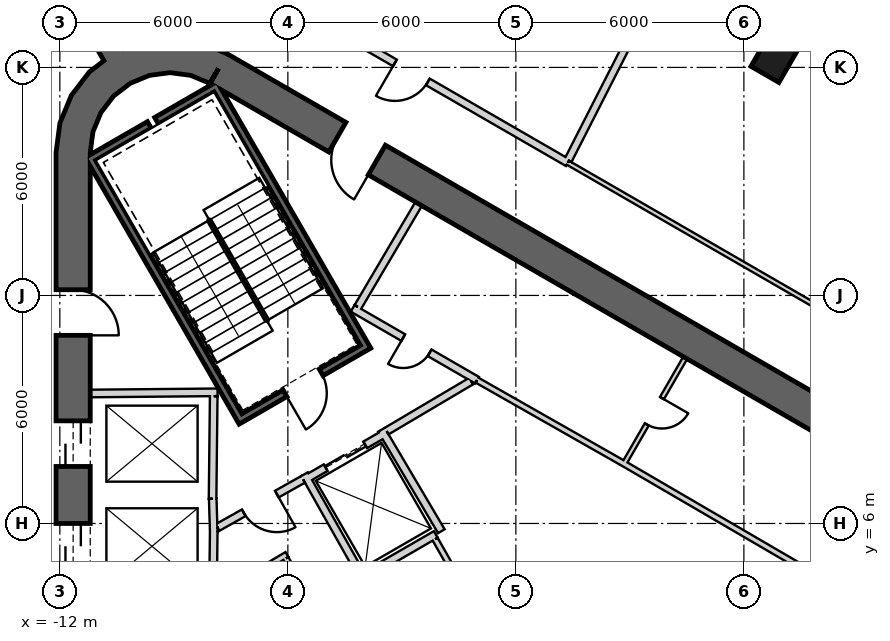
"""IFC4 building model, lengths in metres.
Left out: names, types, materials, properties, quantities, classifications, styles, units other than length and angle.
Written with IfcOpenShell. Run it as: python <this file> out.ifc"""

import sys

from ifc_helpers import new_model, si_unit, direction, frame, frame_2d, origin, origin_2d, place, context, subcontext, project, spatial, polyline, rectangle, outline, extrude, element, fill, save


model = new_model("IFC4")
c1 = context("Model", 3, precision=1e-05, world=origin(), true_north=direction((0.0, 1.0)))
c2 = subcontext(c1, "Body", "Model", "MODEL_VIEW")
j1 = project(units=[si_unit("LENGTHUNIT", "METRE"), si_unit("PLANEANGLEUNIT", "RADIAN")], contexts=[c1])
p1 = place(None, origin())
s1 = spatial("IfcSite", under=j1, at=p1, CompositionType="ELEMENT")
p2 = place(p1, origin())
s2 = spatial("IfcBuilding", under=s1, at=p2, CompositionType="ELEMENT")
p3 = place(p2, frame((0.0, 0.0, 357.2)))
s3 = spatial("IfcBuildingStorey", under=s2, at=p3, CompositionType="ELEMENT", Elevation=357.2)
p4 = place(p3, frame((6.904, 18.422, 0.0), z_axis=(0.0, 0.0, 1.0), x_axis=(0.5, 0.866025403784, 0.0)))
e1 = element("IfcColumn", 1, at=p4, inside=s3, PredefinedType="COLUMN", context=c2, shape_type="SweptSolid", body=[
    extrude(rectangle(XDim=1.4, YDim=0.85, at=origin_2d()), origin(), (0.0, 0.0, 1.0), 3.9),
])
p5 = place(p3, frame((19.475, 2.208, 0.0), z_axis=(0.0, 0.0, 1.0), x_axis=(-0.866028369851, 0.499994862586, 0.0)))
e2 = element("IfcWall", 2, at=p5, inside=s3, PredefinedType="SHEAR", context=c2, shape_type="SweptSolid", body=[
    extrude(rectangle(XDim=31.523, YDim=0.9, at=frame_2d((15.762, 0.0))), origin(), (0.0, 0.0, 1.0), 3.9),
])
p6 = place(p5, frame((7.062, 0.0, 0.0)))
e3 = element("IfcOpeningElement", 3, at=p6, cuts=e2, PredefinedType="OPENING", context=c2, shape_type="SweptSolid", body=[
    extrude(rectangle(XDim=1.2, YDim=2.4, at=frame_2d((0.6, 1.2))), frame((0.0, 0.46, 0.0), z_axis=(0.0, -1.0, 0.0), x_axis=(1.0, 0.0, 0.0)), (0.0, 0.0, 1.0), 0.92),
])
p7 = place(p5, frame((3.612, 0.0, 0.0)))
e4 = element("IfcOpeningElement", 4, at=p7, cuts=e2, PredefinedType="OPENING", context=c2, shape_type="SweptSolid", body=[
    extrude(rectangle(XDim=1.2, YDim=2.4, at=frame_2d((0.6, 1.2))), frame((0.0, 0.46, 0.0), z_axis=(0.0, -1.0, 0.0), x_axis=(1.0, 0.0, 0.0)), (0.0, 0.0, 1.0), 0.92),
])
p8 = place(p5, frame((26.712, 0.0, 0.0)))
e5 = element("IfcOpeningElement", 5, at=p8, cuts=e2, PredefinedType="OPENING", context=c2, shape_type="SweptSolid", body=[
    extrude(rectangle(XDim=1.2, YDim=2.4, at=frame_2d((0.6, 1.2))), frame((0.0, 0.46, 0.0), z_axis=(0.0, -1.0, 0.0), x_axis=(1.0, 0.0, 0.0)), (0.0, 0.0, 1.0), 0.92),
])
p9 = place(p3, frame((-11.65, 15.762, 0.0), z_axis=(0.0, 0.0, 1.0), x_axis=(0.0, -1.0, 0.0)))
e6 = element("IfcWall", 6, at=p9, inside=s3, PredefinedType="SHEAR", context=c2, shape_type="SweptSolid", body=[
    extrude(rectangle(XDim=31.523, YDim=0.9, at=frame_2d((15.762, 0.0))), origin(), (0.0, 0.0, 1.0), 3.9),
])
p10 = place(p9, frame((7.062, 0.0, 0.0)))
e7 = element("IfcOpeningElement", 7, at=p10, cuts=e6, PredefinedType="OPENING", context=c2, shape_type="SweptSolid", body=[
    extrude(rectangle(XDim=1.2, YDim=2.4, at=frame_2d((0.6, 1.2))), frame((0.0, 0.46, 0.0), z_axis=(0.0, -1.0, 0.0), x_axis=(1.0, 0.0, 0.0)), (0.0, 0.0, 1.0), 0.92),
])
p11 = place(p9, frame((9.762, 0.0, 0.0)))
e8 = element("IfcOpeningElement", 8, at=p11, cuts=e6, PredefinedType="OPENING", context=c2, shape_type="SweptSolid", body=[
    extrude(rectangle(XDim=1.2, YDim=2.4, at=frame_2d((0.6, 1.2))), frame((0.0, 0.46, 0.0), z_axis=(0.0, -1.0, 0.0), x_axis=(1.0, 0.0, 0.0)), (0.0, 0.0, 1.0), 0.92),
])
p12 = place(p9, frame((12.462, 0.0, 0.0)))
e9 = element("IfcOpeningElement", 9, at=p12, cuts=e6, PredefinedType="OPENING", context=c2, shape_type="SweptSolid", body=[
    extrude(rectangle(XDim=1.2, YDim=2.4, at=frame_2d((0.6, 1.2))), frame((0.0, 0.46, 0.0), z_axis=(0.0, -1.0, 0.0), x_axis=(1.0, 0.0, 0.0)), (0.0, 0.0, 1.0), 0.92),
])
p13 = place(p9, frame((15.162, 0.0, 0.0)))
e10 = element("IfcOpeningElement", 10, at=p13, cuts=e6, PredefinedType="OPENING", context=c2, shape_type="SweptSolid", body=[
    extrude(rectangle(XDim=1.2, YDim=2.4, at=frame_2d((0.6, 1.2))), frame((0.0, 0.46, 0.0), z_axis=(0.0, -1.0, 0.0), x_axis=(1.0, 0.0, 0.0)), (0.0, 0.0, 1.0), 0.92),
])
p14 = place(p9, frame((17.862, 0.0, 0.0)))
e11 = element("IfcOpeningElement", 11, at=p14, cuts=e6, PredefinedType="OPENING", context=c2, shape_type="SweptSolid", body=[
    extrude(rectangle(XDim=1.2, YDim=2.4, at=frame_2d((0.6, 1.2))), frame((0.0, 0.46, 0.0), z_axis=(0.0, -1.0, 0.0), x_axis=(1.0, 0.0, 0.0)), (0.0, 0.0, 1.0), 0.92),
])
p15 = place(p9, frame((20.562, 0.0, 0.0)))
e12 = element("IfcOpeningElement", 12, at=p15, cuts=e6, PredefinedType="OPENING", context=c2, shape_type="SweptSolid", body=[
    extrude(rectangle(XDim=1.2, YDim=2.4, at=frame_2d((0.6, 1.2))), frame((0.0, 0.46, 0.0), z_axis=(0.0, -1.0, 0.0), x_axis=(1.0, 0.0, 0.0)), (0.0, 0.0, 1.0), 0.92),
])
p16 = place(p9, frame((23.262, 0.0, 0.0)))
e13 = element("IfcOpeningElement", 13, at=p16, cuts=e6, PredefinedType="OPENING", context=c2, shape_type="SweptSolid", body=[
    extrude(rectangle(XDim=1.2, YDim=2.4, at=frame_2d((0.6, 1.2))), frame((0.0, 0.46, 0.0), z_axis=(0.0, -1.0, 0.0), x_axis=(1.0, 0.0, 0.0)), (0.0, 0.0, 1.0), 0.92),
])
p17 = place(p9, frame((3.612, 0.0, 0.0)))
e14 = element("IfcOpeningElement", 14, at=p17, cuts=e6, PredefinedType="OPENING", context=c2, shape_type="SweptSolid", body=[
    extrude(rectangle(XDim=1.2, YDim=2.4, at=frame_2d((0.6, 1.2))), frame((0.0, 0.46, 0.0), z_axis=(0.0, -1.0, 0.0), x_axis=(1.0, 0.0, 0.0)), (0.0, 0.0, 1.0), 0.92),
])
p18 = place(p9, frame((26.712, 0.0, 0.0)))
e15 = element("IfcOpeningElement", 15, at=p18, cuts=e6, PredefinedType="OPENING", context=c2, shape_type="SweptSolid", body=[
    extrude(rectangle(XDim=1.2, YDim=2.4, at=frame_2d((0.6, 1.2))), frame((0.0, 0.46, 0.0), z_axis=(0.0, -1.0, 0.0), x_axis=(1.0, 0.0, 0.0)), (0.0, 0.0, 1.0), 0.92),
])
p19 = place(p3, origin())
e16 = element("IfcWall", 16, at=p19, inside=s3, PredefinedType="SHEAR", context=c2, shape_type="SweptSolid", body=[
    extrude(outline(polyline([(-7.6, 18.36), (-8.323, 18.659), (-9.1, 18.762), (-9.876, 18.659), (-10.6, 18.36), (-11.221, 17.883), (-11.698, 17.262), (-11.998, 16.538), (-12.1, 15.762), (-11.2, 15.762), (-11.128, 16.305), (-10.919, 16.812), (-10.585, 17.247), (-10.15, 17.58), (-9.644, 17.79), (-9.1, 17.862), (-8.556, 17.79), (-8.05, 17.58), (-7.6, 18.36)])), origin(), (0.0, 0.0, 1.0), 3.9),
])
p20 = place(p3, frame((-10.575, 18.316, 0.0), z_axis=(0.0, 0.0, 1.0), x_axis=(-0.500009454961, 0.866019944892, 0.0)))
e17 = element("IfcWall", 17, at=p20, inside=s3, PredefinedType="SHEAR", context=c2, shape_type="SweptSolid", body=[
    extrude(rectangle(XDim=7.388, YDim=0.6, at=frame_2d((3.694, 0.0))), origin(), (0.0, 0.0, 1.0), 3.9),
])
p21 = place(p20, frame((1.4, 0.0, 0.0)))
e18 = element("IfcOpeningElement", 18, at=p21, cuts=e17, PredefinedType="OPENING", context=c2, shape_type="SweptSolid", body=[
    extrude(rectangle(XDim=1.4, YDim=2.4, at=frame_2d((0.7, 1.2))), frame((0.0, 0.31, 0.0), z_axis=(0.0, -1.0, 0.0), x_axis=(1.0, 0.0, 0.0)), (0.0, 0.0, 1.0), 0.62),
])
p22 = place(p3, frame((-11.2, 9.42, 0.0), z_axis=(0.0, 0.0, 1.0), x_axis=(0.999957167047, 0.009255488683, 0.0)))
e19 = element("IfcWall", 19, at=p22, inside=s3, PredefinedType="PLUMBINGWALL", context=c2, shape_type="SweptSolid", body=[
    extrude(rectangle(XDim=3.35, YDim=0.2, at=frame_2d((1.675, 0.0))), origin(), (0.0, 0.0, 1.0), 3.6),
])
p23 = place(p3, frame((-7.951, 9.35, 0.0), z_axis=(0.0, 0.0, 1.0), x_axis=(-0.011120469654, -0.999938165666, 0.0)))
e20 = element("IfcWall", 20, at=p23, inside=s3, PredefinedType="PLUMBINGWALL", context=c2, shape_type="SweptSolid", body=[
    extrude(rectangle(XDim=2.7, YDim=0.2, at=frame_2d((1.35, 0.0))), origin(), (0.0, 0.0, 1.0), 3.6),
])
p24 = place(p3, frame((-7.977, 6.65, 0.0), z_axis=(0.0, 0.0, 1.0), x_axis=(0.030861509705, -0.999523670164, 0.0)))
e21 = element("IfcWall", 21, at=p24, inside=s3, PredefinedType="PLUMBINGWALL", context=c2, shape_type="SweptSolid", body=[
    extrude(rectangle(XDim=0.878, YDim=0.2, at=frame_2d((0.439, 0.0))), origin(), (0.0, 0.0, 1.0), 3.6),
])
p25 = place(p3, frame((-7.949, 5.895, 0.0), z_axis=(0.0, 0.0, 1.0), x_axis=(-0.012042535896, -0.999927486035, 0.0)))
e22 = element("IfcWall", 22, at=p25, inside=s3, PredefinedType="PLUMBINGWALL", context=c2, shape_type="SweptSolid", body=[
    extrude(rectangle(XDim=1.845, YDim=0.2, at=frame_2d((0.922, 0.0))), origin(), (0.0, 0.0, 1.0), 3.6),
])
p26 = place(p3, frame((-11.245, 15.678, -0.3), z_axis=(0.0, 0.0, 1.0), x_axis=(0.499977274689, -0.866038523851, 0.0)))
e23 = element("IfcWall", 23, at=p26, inside=s3, PredefinedType="SHEAR", context=c2, shape_type="SweptSolid", body=[
    extrude(rectangle(XDim=8.1, YDim=0.2, at=frame_2d((4.05, 0.0))), origin(), (0.0, 0.0, 1.0), 3.9),
])
p27 = place(p3, frame((-7.818, 17.541, -0.3), z_axis=(0.0, 0.0, 1.0), x_axis=(-0.866044365799, -0.499967155389, 0.0)))
e24 = element("IfcWall", 24, at=p27, inside=s3, PredefinedType="SHEAR", context=c2, shape_type="SweptSolid", body=[
    extrude(rectangle(XDim=3.8, YDim=0.2, at=frame_2d((1.9, 0.0))), origin(), (0.0, 0.0, 1.0), 3.9),
])
p28 = place(p3, frame((-7.854, 17.405, -0.3), z_axis=(0.0, 0.0, 1.0), x_axis=(0.499997992926, -0.866026562566, 0.0)))
e25 = element("IfcWall", 25, at=p28, inside=s3, PredefinedType="SHEAR", context=c2, shape_type="SweptSolid", body=[
    extrude(rectangle(XDim=7.9, YDim=0.2, at=frame_2d((3.95, 0.0))), origin(), (0.0, 0.0, 1.0), 3.9),
])
p29 = place(p3, frame((-7.159, 8.8, -0.3), z_axis=(0.0, 0.0, 1.0), x_axis=(0.866047807691, 0.499961193289, 0.0)))
e26 = element("IfcWall", 26, at=p29, inside=s3, PredefinedType="SHEAR", context=c2, shape_type="SweptSolid", body=[
    extrude(rectangle(XDim=3.6, YDim=0.2, at=frame_2d((1.8, 0.0))), origin(), (0.0, 0.0, 1.0), 3.9),
])
p30 = place(p29, frame((1.25, 0.0, 0.3)))
e27 = element("IfcOpeningElement", 27, at=p30, cuts=e26, PredefinedType="OPENING", context=c2, shape_type="SweptSolid", body=[
    extrude(rectangle(XDim=1.1, YDim=2.1, at=frame_2d((0.55, 1.05))), frame((0.0, 0.11, 0.0), z_axis=(0.0, -1.0, 0.0), x_axis=(1.0, 0.0, 0.0)), (0.0, 0.0, 1.0), 0.22),
])
p31 = place(p3, frame((-5.524, 7.168, 0.0), z_axis=(0.0, 0.0, 1.0), x_axis=(0.866024647952, 0.500001309137, 0.0)))
e28 = element("IfcWall", 28, at=p31, inside=s3, PredefinedType="PLUMBINGWALL", context=c2, shape_type="SweptSolid", body=[
    extrude(rectangle(XDim=2.4, YDim=0.2, at=frame_2d((1.2, 0.0))), origin(), (0.0, 0.0, 1.0), 3.6),
])
p32 = place(p31, frame((0.6, 0.0, 0.0)))
e29 = element("IfcOpeningElement", 29, at=p32, cuts=e28, PredefinedType="OPENING", context=c2, shape_type="SweptSolid", body=[
    extrude(rectangle(XDim=1.2, YDim=2.4, at=frame_2d((0.6, 1.2))), frame((0.0, 0.11, 0.0), z_axis=(0.0, -1.0, 0.0), x_axis=(1.0, 0.0, 0.0)), (0.0, 0.0, 1.0), 0.22),
])
p33 = place(p3, frame((-3.538, 8.465, 0.0), z_axis=(0.0, 0.0, 1.0), x_axis=(0.508647062354, -0.860975125052, 0.0)))
e30 = element("IfcWall", 30, at=p33, inside=s3, PredefinedType="PLUMBINGWALL", context=c2, shape_type="SweptSolid", body=[
    extrude(rectangle(XDim=3.1, YDim=0.2, at=frame_2d((1.55, 0.0))), origin(), (0.0, 0.0, 1.0), 3.6),
])
p34 = place(p3, frame((-1.979, 5.786, 0.0), z_axis=(0.0, 0.0, 1.0), x_axis=(-0.866016689309, -0.500015093611, 0.0)))
e31 = element("IfcWall", 31, at=p34, inside=s3, PredefinedType="PLUMBINGWALL", context=c2, shape_type="SweptSolid", body=[
    extrude(rectangle(XDim=2.479, YDim=0.2, at=frame_2d((1.24, 0.0))), origin(), (0.0, 0.0, 1.0), 3.6),
])
p35 = place(p3, frame((-5.562, 7.296, 0.0), z_axis=(0.0, 0.0, 1.0), x_axis=(0.49134651263, -0.870964180966, 0.0)))
e32 = element("IfcWall", 32, at=p35, inside=s3, PredefinedType="PLUMBINGWALL", context=c2, shape_type="SweptSolid", body=[
    extrude(rectangle(XDim=3.0, YDim=0.2, at=frame_2d((1.5, 0.0))), origin(), (0.0, 0.0, 1.0), 3.6),
])
p36 = place(p3, frame((5.17, 6.195, 0.0), z_axis=(0.0, 0.0, 1.0), x_axis=(0.499984717929, 0.866034226713, 0.0)))
e33 = element("IfcWall", 33, at=p36, inside=s3, PredefinedType="PARTITIONING", context=c2, shape_type="SweptSolid", body=[
    extrude(rectangle(XDim=3.25, YDim=0.12, at=frame_2d((1.625, 0.0))), origin(), (0.0, 0.0, 1.0), 3.6),
])
p37 = place(p36, frame((1.225, 0.0, 0.0)))
e34 = element("IfcOpeningElement", 34, at=p37, cuts=e33, PredefinedType="OPENING", context=c2, shape_type="SweptSolid", body=[
    extrude(rectangle(XDim=0.8, YDim=2.1, at=frame_2d((0.4, 1.05))), frame((0.0, 0.07, 0.0), z_axis=(0.0, -1.0, 0.0), x_axis=(1.0, 0.0, 0.0)), (0.0, 0.0, 1.0), 0.14),
])
p38 = place(p3, frame((8.931, 4.025, 0.0), z_axis=(0.0, 0.0, 1.0), x_axis=(-0.862666884027, 0.505772525157, 0.0)))
e35 = element("IfcWall", 35, at=p38, inside=s3, PredefinedType="PLUMBINGWALL", context=c2, shape_type="SweptSolid", body=[
    extrude(rectangle(XDim=4.372, YDim=0.15, at=frame_2d((2.186, 0.0))), origin(), (0.0, 0.0, 1.0), 3.6),
])
p39 = place(p3, frame((-0.22, 13.06, 0.0), z_axis=(0.0, 0.0, 1.0), x_axis=(-0.499984717929, -0.866034226713, 0.0)))
e36 = element("IfcWall", 36, at=p39, inside=s3, PredefinedType="PARTITIONING", context=c2, shape_type="SweptSolid", body=[
    extrude(rectangle(XDim=3.25, YDim=0.12, at=frame_2d((1.625, 0.0))), origin(), (0.0, 0.0, 1.0), 3.6),
])
p40 = place(p39, frame((1.225, 0.0, 0.0)))
e37 = element("IfcOpeningElement", 37, at=p40, cuts=e36, PredefinedType="OPENING", context=c2, shape_type="SweptSolid", body=[
    extrude(rectangle(XDim=0.8, YDim=2.1, at=frame_2d((0.4, 1.05))), frame((0.0, 0.07, 0.0), z_axis=(0.0, -1.0, 0.0), x_axis=(1.0, 0.0, 0.0)), (0.0, 0.0, 1.0), 0.14),
])
p41 = place(p3, frame((-1.941, 10.339, 0.0), z_axis=(0.0, 0.0, 1.0), x_axis=(0.850216889117, -0.526432561171, 0.0)))
e38 = element("IfcWall", 38, at=p41, inside=s3, PredefinedType="PARTITIONING", context=c2, shape_type="SweptSolid", body=[
    extrude(rectangle(XDim=1.078, YDim=0.2, at=frame_2d((0.539, 0.0))), origin(), (0.0, 0.0, 1.0), 3.6),
])
p42 = place(p3, frame((5.159, 6.236, 0.0), z_axis=(0.0, 0.0, 1.0), x_axis=(-0.868105023632, 0.496380567654, 0.0)))
e39 = element("IfcWall", 39, at=p42, inside=s3, PredefinedType="PLUMBINGWALL", context=c2, shape_type="SweptSolid", body=[
    extrude(rectangle(XDim=7.072, YDim=0.15, at=frame_2d((3.536, 0.0))), origin(), (0.0, 0.0, 1.0), 3.6),
])
p43 = place(p3, frame((-4.296, 11.659, 0.0), z_axis=(0.0, 0.0, 1.0), x_axis=(0.871534483978, -0.490334215854, 0.0)))
e40 = element("IfcWall", 40, at=p43, inside=s3, PredefinedType="PARTITIONING", context=c2, shape_type="SweptSolid", body=[
    extrude(rectangle(XDim=2.7, YDim=0.2, at=frame_2d((1.35, 0.0))), origin(), (0.0, 0.0, 1.0), 3.6),
])
p44 = place(p3, frame((-2.558, 14.409, 0.0), z_axis=(0.0, 0.0, 1.0), x_axis=(-0.508018930956, -0.861345903683, 0.0)))
e41 = element("IfcWall", 41, at=p44, inside=s3, PredefinedType="PARTITIONING", context=c2, shape_type="SweptSolid", body=[
    extrude(rectangle(XDim=3.15, YDim=0.2, at=frame_2d((1.575, 0.0))), origin(), (0.0, 0.0, 1.0), 3.6),
])
p45 = place(p44, frame((1.175, 0.0, 0.0)))
e42 = element("IfcOpeningElement", 42, at=p45, cuts=e41, PredefinedType="OPENING", context=c2, shape_type="SweptSolid", body=[
    extrude(rectangle(XDim=0.8, YDim=2.1, at=frame_2d((0.4, 1.05))), frame((0.0, 0.11, 0.0), z_axis=(0.0, -1.0, 0.0), x_axis=(1.0, 0.0, 0.0)), (0.0, 0.0, 1.0), 0.22),
])
p46 = place(p3, frame((-1.055, 9.818, 0.0), z_axis=(0.0, 0.0, 1.0), x_axis=(-0.860614334655, -0.50925726994, 0.0)))
e43 = element("IfcWall", 43, at=p46, inside=s3, PredefinedType="PARTITIONING", context=c2, shape_type="SweptSolid", body=[
    extrude(rectangle(XDim=2.726, YDim=0.2, at=frame_2d((1.363, 0.0))), origin(), (0.0, 0.0, 1.0), 3.6),
])
p47 = place(p3, frame((-5.6, 7.16, 0.0), z_axis=(0.0, 0.0, 1.0), x_axis=(-0.871363259478, -0.490638431059, 0.0)))
e44 = element("IfcWall", 44, at=p47, inside=s3, PredefinedType="PARTITIONING", context=c2, shape_type="SweptSolid", body=[
    extrude(rectangle(XDim=2.581, YDim=0.2, at=frame_2d((1.291, 0.0))), origin(), (0.0, 0.0, 1.0), 3.6),
])
p48 = place(p47, frame((0.791, 0.0, 0.0)))
e45 = element("IfcOpeningElement", 45, at=p48, cuts=e44, PredefinedType="OPENING", context=c2, shape_type="SweptSolid", body=[
    extrude(rectangle(XDim=1.0, YDim=2.1, at=frame_2d((0.5, 1.05))), frame((0.0, 0.11, 0.0), z_axis=(0.0, -1.0, 0.0), x_axis=(1.0, 0.0, 0.0)), (0.0, 0.0, 1.0), 0.22),
])
p49 = place(p3, frame((-1.994, 5.661, 0.0), z_axis=(0.0, 0.0, 1.0), x_axis=(0.494341211302, -0.869267948798, 0.0)))
e46 = element("IfcWall", 46, at=p49, inside=s3, PredefinedType="PLUMBINGWALL", context=c2, shape_type="SweptSolid", body=[
    extrude(rectangle(XDim=4.361, YDim=0.15, at=frame_2d((2.18, 0.0))), origin(), (0.0, 0.0, 1.0), 3.6),
])
p50 = place(p3, frame((-6.037, 5.176, 0.0), z_axis=(0.0, 0.0, 1.0), x_axis=(-0.860106072674, -0.510115225953, 0.0)))
e47 = element("IfcWall", 47, at=p50, inside=s3, PredefinedType="PARTITIONING", context=c2, shape_type="SweptSolid", body=[
    extrude(rectangle(XDim=2.225, YDim=0.12, at=frame_2d((1.112, 0.0))), origin(), (0.0, 0.0, 1.0), 3.6),
])
p51 = place(p3, frame((-4.558, 2.495, 0.0), z_axis=(0.0, 0.0, 1.0), x_axis=(-0.499990139034, 0.866031096941, 0.0)))
e48 = element("IfcWall", 48, at=p51, inside=s3, PredefinedType="PARTITIONING", context=c2, shape_type="SweptSolid", body=[
    extrude(rectangle(XDim=3.0, YDim=0.12, at=frame_2d((1.5, 0.0))), origin(), (0.0, 0.0, 1.0), 3.6),
])
p52 = place(p3, frame((16.523, 8.358, 0.0), z_axis=(0.0, 0.0, 1.0), x_axis=(-0.866024307761, 0.500001898363, 0.0)))
e49 = element("IfcWall", 49, at=p52, inside=s3, PredefinedType="PARTITIONING", context=c2, shape_type="SweptSolid", body=[
    extrude(rectangle(XDim=16.865, YDim=0.2, at=frame_2d((8.432, 0.0))), origin(), (0.0, 0.0, 1.0), 3.07),
])
p53 = place(p52, frame((7.924, 0.0, 0.0)))
e50 = element("IfcOpeningElement", 50, at=p53, cuts=e49, PredefinedType="OPENING", context=c2, shape_type="SweptSolid", body=[
    extrude(rectangle(XDim=1.0, YDim=2.1, at=frame_2d((0.5, 1.05))), frame((0.0, 0.11, 0.0), z_axis=(0.0, -1.0, 0.0), x_axis=(1.0, 0.0, 0.0)), (0.0, 0.0, 1.0), 0.22),
])
p54 = place(p3, frame((1.918, 16.791, 0.0), z_axis=(0.0, 0.0, 1.0), x_axis=(-0.866027719511, 0.499995989022, 0.0)))
e51 = element("IfcWall", 51, at=p54, inside=s3, PredefinedType="PARTITIONING", context=c2, shape_type="SweptSolid", body=[
    extrude(rectangle(XDim=9.606, YDim=0.2, at=frame_2d((4.803, 0.0))), origin(), (0.0, 0.0, 1.0), 2.97),
])
p55 = place(p54, frame((4.303, 0.0, 0.0)))
e52 = element("IfcOpeningElement", 52, at=p55, cuts=e51, PredefinedType="OPENING", context=c2, shape_type="SweptSolid", body=[
    extrude(rectangle(XDim=1.0, YDim=2.1, at=frame_2d((0.5, 1.05))), frame((0.0, 0.11, 0.0), z_axis=(0.0, -1.0, 0.0), x_axis=(1.0, 0.0, 0.0)), (0.0, 0.0, 1.0), 0.22),
])
p56 = place(p3, frame((5.852, 24.465, 0.0), z_axis=(0.0, 0.0, 1.0), x_axis=(-0.454427213858, -0.890783872387, 0.0)))
e53 = element("IfcWall", 53, at=p56, inside=s3, PredefinedType="PARTITIONING", context=c2, shape_type="SweptSolid", body=[
    extrude(rectangle(XDim=8.525, YDim=0.2, at=frame_2d((4.263, 0.0))), origin(), (0.0, 0.0, 1.0), 3.6),
])
p57 = place(p30, origin())
e54 = element("IfcDoor", 54, at=p57, inside=s3, OperationType="SINGLE_SWING_LEFT", PredefinedType="USERDEFINED", context=c2, shape_type="SweptSolid", body=[
    extrude(rectangle(XDim=1.1, YDim=2.1, at=frame_2d((0.55, 1.05))), frame((0.0, 0.025, 0.0), z_axis=(0.0, -1.0, 0.0), x_axis=(1.0, 0.0, 0.0)), (0.0, 0.0, 1.0), 0.05),
])
fill(e27, e54)
p58 = place(p48, origin())
e55 = element("IfcDoor", 55, at=p58, inside=s3, OperationType="SINGLE_SWING_RIGHT", PredefinedType="USERDEFINED", context=c2, shape_type="SweptSolid", body=[
    extrude(rectangle(XDim=1.0, YDim=2.1, at=frame_2d((0.5, 1.05))), frame((0.0, 0.025, 0.0), z_axis=(0.0, -1.0, 0.0), x_axis=(1.0, 0.0, 0.0)), (0.0, 0.0, 1.0), 0.05),
])
fill(e45, e55)
p59 = place(p32, origin())
e56 = element("IfcDoor", 56, at=p59, inside=s3, OperationType="SLIDING_TO_LEFT", PredefinedType="USERDEFINED", context=c2, shape_type="SweptSolid", body=[
    extrude(rectangle(XDim=1.2, YDim=2.4, at=frame_2d((0.6, 1.2))), frame((0.0, 0.025, 0.0), z_axis=(0.0, -1.0, 0.0), x_axis=(1.0, 0.0, 0.0)), (0.0, 0.0, 1.0), 0.05),
])
fill(e29, e56)
p60 = place(p37, origin())
e57 = element("IfcDoor", 57, at=p60, inside=s3, OperationType="SINGLE_SWING_LEFT", PredefinedType="USERDEFINED", context=c2, shape_type="SweptSolid", body=[
    extrude(rectangle(XDim=0.8, YDim=2.1, at=frame_2d((0.4, 1.05))), frame((0.0, 0.025, 0.0), z_axis=(0.0, -1.0, 0.0), x_axis=(1.0, 0.0, 0.0)), (0.0, 0.0, 1.0), 0.05),
])
fill(e34, e57)
p61 = place(p45, origin())
e58 = element("IfcDoor", 58, at=p61, inside=s3, OperationType="SINGLE_SWING_RIGHT", PredefinedType="USERDEFINED", context=c2, shape_type="SweptSolid", body=[
    extrude(rectangle(XDim=0.8, YDim=2.1, at=frame_2d((0.4, 1.05))), frame((0.0, 0.025, 0.0), z_axis=(0.0, -1.0, 0.0), x_axis=(1.0, 0.0, 0.0)), (0.0, 0.0, 1.0), 0.05),
])
fill(e42, e58)
p62 = place(p40, origin())
e59 = element("IfcDoor", 59, at=p62, inside=s3, OperationType="SINGLE_SWING_LEFT", PredefinedType="USERDEFINED", context=c2, shape_type="SweptSolid", body=[
    extrude(rectangle(XDim=0.8, YDim=2.1, at=frame_2d((0.4, 1.05))), frame((0.0, 0.025, 0.0), z_axis=(0.0, -1.0, 0.0), x_axis=(1.0, 0.0, 0.0)), (0.0, 0.0, 1.0), 0.05),
])
fill(e37, e59)
p63 = place(p10, origin())
e60 = element("IfcDoor", 60, at=p63, inside=s3, OperationType="SLIDING_TO_LEFT", PredefinedType="USERDEFINED", context=c2, shape_type="SweptSolid", body=[
    extrude(rectangle(XDim=1.2, YDim=2.4, at=frame_2d((0.6, 1.2))), frame((0.0, 0.025, 0.0), z_axis=(0.0, -1.0, 0.0), x_axis=(1.0, 0.0, 0.0)), (0.0, 0.0, 1.0), 0.05),
])
fill(e7, e60)
p64 = place(p11, origin())
e61 = element("IfcDoor", 61, at=p64, inside=s3, OperationType="SLIDING_TO_LEFT", PredefinedType="USERDEFINED", context=c2, shape_type="SweptSolid", body=[
    extrude(rectangle(XDim=1.2, YDim=2.4, at=frame_2d((0.6, 1.2))), frame((0.0, 0.025, 0.0), z_axis=(0.0, -1.0, 0.0), x_axis=(1.0, 0.0, 0.0)), (0.0, 0.0, 1.0), 0.05),
])
fill(e8, e61)
p65 = place(p8, origin())
e62 = element("IfcDoor", 62, at=p65, inside=s3, OperationType="SINGLE_SWING_LEFT", PredefinedType="USERDEFINED", context=c2, shape_type="SweptSolid", body=[
    extrude(rectangle(XDim=1.2, YDim=2.4, at=frame_2d((0.6, 1.2))), frame((0.0, 0.025, 0.0), z_axis=(0.0, -1.0, 0.0), x_axis=(1.0, 0.0, 0.0)), (0.0, 0.0, 1.0), 0.05),
])
fill(e5, e62)
p66 = place(p17, origin())
e63 = element("IfcDoor", 63, at=p66, inside=s3, OperationType="SINGLE_SWING_RIGHT", PredefinedType="USERDEFINED", context=c2, shape_type="SweptSolid", body=[
    extrude(rectangle(XDim=1.2, YDim=2.4, at=frame_2d((0.6, 1.2))), frame((0.0, 0.025, 0.0), z_axis=(0.0, -1.0, 0.0), x_axis=(1.0, 0.0, 0.0)), (0.0, 0.0, 1.0), 0.05),
])
fill(e14, e63)
save(model, sys.argv[1])
